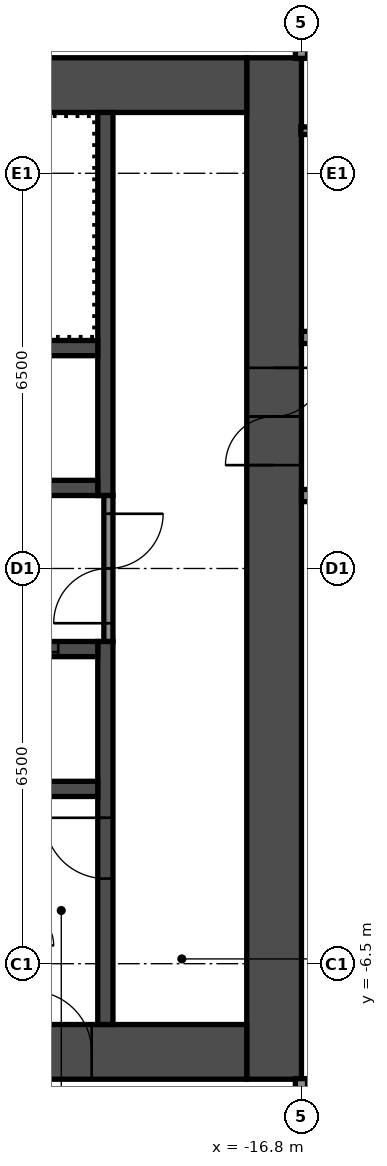
"""IFC4 building model, lengths in metres.
Left out: names, types, materials, properties, quantities, classifications, styles, units other than length and angle.
Written with IfcOpenShell. Run it as: python <this file> out.ifc"""

import sys

from ifc_helpers import new_model, si_unit, direction, frame, frame_2d, origin, place, context, subcontext, project, spatial, rectangle, extrude, element, fill, save


model = new_model("IFC4")
c1 = context("Model", 3, precision=1e-05, world=origin(), true_north=direction((0.0, 1.0)))
c2 = subcontext(c1, "Body", "Model", "MODEL_VIEW")
j1 = project(units=[si_unit("LENGTHUNIT", "METRE"), si_unit("PLANEANGLEUNIT", "RADIAN")], contexts=[c1])
p1 = place(None, origin())
s1 = spatial("IfcSite", under=j1, at=p1, CompositionType="ELEMENT")
p2 = place(p1, origin())
s2 = spatial("IfcBuilding", under=s1, at=p2, CompositionType="ELEMENT")
p3 = place(p2, frame((0.0, 0.0, 209.0)))
s3 = spatial("IfcBuildingStorey", under=s2, at=p3, CompositionType="ELEMENT", Elevation=209.0)
p4 = place(p3, frame((-17.25, -8.4, 0.0), z_axis=(0.0, 0.0, 1.0), x_axis=(0.0, 1.0, 0.0)))
e1 = element("IfcWall", 1, at=p4, inside=s3, PredefinedType="SHEAR", context=c2, shape_type="SweptSolid", body=[
    extrude(rectangle(XDim=16.8, YDim=0.9, at=frame_2d((8.4, 0.0))), origin(), (0.0, 0.0, 1.0), 2.75),
])
p5 = place(p4, frame((10.1, 0.0, 0.0)))
e2 = element("IfcOpeningElement", 2, at=p5, cuts=e1, PredefinedType="OPENING", context=c2, shape_type="SweptSolid", body=[
    extrude(rectangle(XDim=1.6, YDim=2.1, at=frame_2d((0.8, 1.05))), frame((0.0, 0.46, 0.0), z_axis=(0.0, -1.0, 0.0), x_axis=(1.0, 0.0, 0.0)), (0.0, 0.0, 1.0), 0.92),
])
p6 = place(p3, frame((-32.7, 7.95, 0.0), z_axis=(0.0, 0.0, 1.0), x_axis=(1.0, 0.0, 0.0)))
e3 = element("IfcWall", 3, at=p6, inside=s3, PredefinedType="SHEAR", context=c2, shape_type="SweptSolid", body=[
    extrude(rectangle(XDim=15.0, YDim=0.9, at=frame_2d((7.5, 0.0))), origin(), (0.0, 0.0, 1.0), 2.75),
])
p7 = place(p6, frame((3.4, 0.0, 0.0)))
e4 = element("IfcOpeningElement", 4, at=p7, cuts=e3, PredefinedType="OPENING", context=c2, shape_type="SweptSolid", body=[
    extrude(rectangle(XDim=1.2, YDim=2.1, at=frame_2d((0.6, 1.05))), frame((0.0, 0.46, 0.0), z_axis=(0.0, -1.0, 0.0), x_axis=(1.0, 0.0, 0.0)), (0.0, 0.0, 1.0), 0.92),
])
p8 = place(p6, frame((0.75, 0.0, 0.0)))
e5 = element("IfcOpeningElement", 5, at=p8, cuts=e3, PredefinedType="OPENING", context=c2, shape_type="SweptSolid", body=[
    extrude(rectangle(XDim=0.9, YDim=2.1, at=frame_2d((0.45, 1.05))), frame((0.0, 0.46, 0.0), z_axis=(0.0, -1.0, 0.0), x_axis=(1.0, 0.0, 0.0)), (0.0, 0.0, 1.0), 0.92),
])
p9 = place(p3, frame((-32.7, -7.95, 0.0), z_axis=(0.0, 0.0, 1.0), x_axis=(1.0, 0.0, 0.0)))
e6 = element("IfcWall", 6, at=p9, inside=s3, PredefinedType="SHEAR", context=c2, shape_type="SweptSolid", body=[
    extrude(rectangle(XDim=15.0, YDim=0.9, at=frame_2d((7.5, 0.0))), origin(), (0.0, 0.0, 1.0), 2.75),
])
p10 = place(p9, frame((11.45, 0.0, 0.0)))
e7 = element("IfcOpeningElement", 7, at=p10, cuts=e6, PredefinedType="OPENING", context=c2, shape_type="SweptSolid", body=[
    extrude(rectangle(XDim=1.0, YDim=2.1, at=frame_2d((0.5, 1.05))), frame((0.0, 0.46, 0.0), z_axis=(0.0, -1.0, 0.0), x_axis=(1.0, 0.0, 0.0)), (0.0, 0.0, 1.0), 0.92),
])
p11 = place(p3, frame((-20.025, 1.2, 0.0), z_axis=(0.0, 0.0, 1.0), x_axis=(0.0, 1.0, 0.0)))
e8 = element("IfcWall", 8, at=p11, inside=s3, PredefinedType="SHEAR", context=c2, shape_type="SweptSolid", body=[
    extrude(rectangle(XDim=6.3, YDim=0.25, at=frame_2d((3.15, 0.0))), origin(), (0.0, 0.0, 1.0), 2.75),
])
p12 = place(p3, frame((-20.025, -7.5, 0.0), z_axis=(0.0, 0.0, 1.0), x_axis=(0.0, 1.0, 0.0)))
e9 = element("IfcWall", 9, at=p12, inside=s3, PredefinedType="SHEAR", context=c2, shape_type="SweptSolid", body=[
    extrude(rectangle(XDim=6.3, YDim=0.25, at=frame_2d((3.15, 0.0))), origin(), (0.0, 0.0, 1.0), 2.75),
])
p13 = place(p12, frame((2.4, 0.0, 0.0)))
e10 = element("IfcOpeningElement", 10, at=p13, cuts=e9, PredefinedType="OPENING", context=c2, shape_type="SweptSolid", body=[
    extrude(rectangle(XDim=1.0, YDim=2.1, at=frame_2d((0.5, 1.05))), frame((0.0, 0.135, 0.0), z_axis=(0.0, -1.0, 0.0), x_axis=(1.0, 0.0, 0.0)), (0.0, 0.0, 1.0), 0.27),
])
p14 = place(p3, frame((-27.65, 1.325, 0.0), z_axis=(0.0, 0.0, 1.0), x_axis=(1.0, 0.0, 0.0)))
e11 = element("IfcWall", 11, at=p14, inside=s3, PredefinedType="SHEAR", context=c2, shape_type="SweptSolid", body=[
    extrude(rectangle(XDim=7.5, YDim=0.25, at=frame_2d((3.75, 0.0))), origin(), (0.0, 0.0, 1.0), 2.75),
])
p15 = place(p14, frame((4.562, 0.0, 0.0)))
e12 = element("IfcOpeningElement", 12, at=p15, cuts=e11, PredefinedType="OPENING", context=c2, shape_type="SweptSolid", body=[
    extrude(rectangle(XDim=0.9, YDim=2.1, at=frame_2d((0.45, 1.05))), frame((0.0, 0.135, 0.0), z_axis=(0.0, -1.0, 0.0), x_axis=(1.0, 0.0, 0.0)), (0.0, 0.0, 1.0), 0.27),
])
p16 = place(p14, frame((0.863, 0.0, 0.0)))
e13 = element("IfcOpeningElement", 13, at=p16, cuts=e11, PredefinedType="OPENING", context=c2, shape_type="SweptSolid", body=[
    extrude(rectangle(XDim=0.9, YDim=2.1, at=frame_2d((0.45, 1.05))), frame((0.0, 0.135, 0.0), z_axis=(0.0, -1.0, 0.0), x_axis=(1.0, 0.0, 0.0)), (0.0, 0.0, 1.0), 0.27),
])
p17 = place(p3, frame((-27.65, 3.625, 0.0), z_axis=(0.0, 0.0, 1.0), x_axis=(1.0, 0.0, 0.0)))
e14 = element("IfcWall", 14, at=p17, inside=s3, PredefinedType="SHEAR", context=c2, shape_type="SweptSolid", body=[
    extrude(rectangle(XDim=7.5, YDim=0.25, at=frame_2d((3.75, 0.0))), origin(), (0.0, 0.0, 1.0), 2.75),
])
p18 = place(p3, frame((-27.65, -1.325, 0.0), z_axis=(0.0, 0.0, 1.0), x_axis=(1.0, 0.0, 0.0)))
e15 = element("IfcWall", 15, at=p18, inside=s3, PredefinedType="SHEAR", context=c2, shape_type="SweptSolid", body=[
    extrude(rectangle(XDim=7.5, YDim=0.25, at=frame_2d((3.75, 0.0))), origin(), (0.0, 0.0, 1.0), 2.75),
])
p19 = place(p18, frame((5.75, 0.0, 0.0)))
e16 = element("IfcOpeningElement", 16, at=p19, cuts=e15, PredefinedType="OPENING", context=c2, shape_type="SweptSolid", body=[
    extrude(rectangle(XDim=1.1, YDim=2.1, at=frame_2d((0.55, 1.05))), frame((0.0, 0.135, 0.0), z_axis=(0.0, -1.0, 0.0), x_axis=(1.0, 0.0, 0.0)), (0.0, 0.0, 1.0), 0.27),
])
p20 = place(p18, frame((3.35, 0.0, 0.0)))
e17 = element("IfcOpeningElement", 17, at=p20, cuts=e15, PredefinedType="OPENING", context=c2, shape_type="SweptSolid", body=[
    extrude(rectangle(XDim=1.1, YDim=2.1, at=frame_2d((0.55, 1.05))), frame((0.0, 0.135, 0.0), z_axis=(0.0, -1.0, 0.0), x_axis=(1.0, 0.0, 0.0)), (0.0, 0.0, 1.0), 0.27),
])
p21 = place(p18, frame((0.95, 0.0, 0.0)))
e18 = element("IfcOpeningElement", 18, at=p21, cuts=e15, PredefinedType="OPENING", context=c2, shape_type="SweptSolid", body=[
    extrude(rectangle(XDim=1.1, YDim=2.1, at=frame_2d((0.55, 1.05))), frame((0.0, 0.135, 0.0), z_axis=(0.0, -1.0, 0.0), x_axis=(1.0, 0.0, 0.0)), (0.0, 0.0, 1.0), 0.27),
])
p22 = place(p3, frame((-27.65, -3.625, 0.0), z_axis=(0.0, 0.0, 1.0), x_axis=(1.0, 0.0, 0.0)))
e19 = element("IfcWall", 19, at=p22, inside=s3, PredefinedType="SHEAR", context=c2, shape_type="SweptSolid", body=[
    extrude(rectangle(XDim=7.5, YDim=0.25, at=frame_2d((3.75, 0.0))), origin(), (0.0, 0.0, 1.0), 2.75),
])
p23 = place(p3, frame((-19.975, -1.2, 0.0), z_axis=(0.0, 0.0, 1.0), x_axis=(0.0, 1.0, 0.0)))
e20 = element("IfcWall", 20, at=p23, inside=s3, PredefinedType="PARTITIONING", context=c2, shape_type="SweptSolid", body=[
    extrude(rectangle(XDim=2.4, YDim=0.15, at=frame_2d((1.2, 0.0))), origin(), (0.0, 0.0, 1.0), 2.75),
])
p24 = place(p23, frame((0.3, 0.0, 0.0)))
e21 = element("IfcOpeningElement", 21, at=p24, cuts=e20, PredefinedType="OPENING", context=c2, shape_type="SweptSolid", body=[
    extrude(rectangle(XDim=1.8, YDim=2.1, at=frame_2d((0.9, 1.05))), frame((0.0, 0.085, 0.0), z_axis=(0.0, -1.0, 0.0), x_axis=(1.0, 0.0, 0.0)), (0.0, 0.0, 1.0), 0.17),
])
p25 = place(p3, frame((-16.8, 1.2, 0.0), z_axis=(0.0, 0.0, 1.0), x_axis=(1.0, 0.0, 0.0)))
e22 = element("IfcWall", 22, at=p25, inside=s3, PredefinedType="PARTITIONING", context=c2, shape_type="SweptSolid", body=[
    extrude(rectangle(XDim=33.6, YDim=0.2, at=frame_2d((16.8, 0.0))), origin(), (0.0, 0.0, 1.0), 2.75),
])
p26 = place(p25, frame((1.9, 0.0, 0.0)))
e23 = element("IfcOpeningElement", 23, at=p26, cuts=e22, PredefinedType="OPENING", context=c2, shape_type="SweptSolid", body=[
    extrude(rectangle(XDim=1.0, YDim=2.1, at=frame_2d((0.5, 1.05))), frame((0.0, 0.11, 0.0), z_axis=(0.0, -1.0, 0.0), x_axis=(1.0, 0.0, 0.0)), (0.0, 0.0, 1.0), 0.22),
])
p27 = place(p25, frame((11.25, 0.0, 0.0)))
e24 = element("IfcOpeningElement", 24, at=p27, cuts=e22, PredefinedType="OPENING", context=c2, shape_type="SweptSolid", body=[
    extrude(rectangle(XDim=1.0, YDim=2.1, at=frame_2d((0.5, 1.05))), frame((0.0, 0.11, 0.0), z_axis=(0.0, -1.0, 0.0), x_axis=(1.0, 0.0, 0.0)), (0.0, 0.0, 1.0), 0.22),
])
p28 = place(p25, frame((12.95, 0.0, 0.0)))
e25 = element("IfcOpeningElement", 25, at=p28, cuts=e22, PredefinedType="OPENING", context=c2, shape_type="SweptSolid", body=[
    extrude(rectangle(XDim=1.0, YDim=2.1, at=frame_2d((0.5, 1.05))), frame((0.0, 0.11, 0.0), z_axis=(0.0, -1.0, 0.0), x_axis=(1.0, 0.0, 0.0)), (0.0, 0.0, 1.0), 0.22),
])
p29 = place(p25, frame((19.04, 0.0, 0.0)))
e26 = element("IfcOpeningElement", 26, at=p29, cuts=e22, PredefinedType="OPENING", context=c2, shape_type="SweptSolid", body=[
    extrude(rectangle(XDim=0.9, YDim=2.1, at=frame_2d((0.45, 1.05))), frame((0.0, 0.11, 0.0), z_axis=(0.0, -1.0, 0.0), x_axis=(1.0, 0.0, 0.0)), (0.0, 0.0, 1.0), 0.22),
])
p30 = place(p25, frame((23.24, 0.0, 0.0)))
e27 = element("IfcOpeningElement", 27, at=p30, cuts=e22, PredefinedType="OPENING", context=c2, shape_type="SweptSolid", body=[
    extrude(rectangle(XDim=0.9, YDim=2.1, at=frame_2d((0.45, 1.05))), frame((0.0, 0.11, 0.0), z_axis=(0.0, -1.0, 0.0), x_axis=(1.0, 0.0, 0.0)), (0.0, 0.0, 1.0), 0.22),
])
p31 = place(p25, frame((28.05, 0.0, 0.0)))
e28 = element("IfcOpeningElement", 28, at=p31, cuts=e22, PredefinedType="OPENING", context=c2, shape_type="SweptSolid", body=[
    extrude(rectangle(XDim=1.0, YDim=2.1, at=frame_2d((0.5, 1.05))), frame((0.0, 0.11, 0.0), z_axis=(0.0, -1.0, 0.0), x_axis=(1.0, 0.0, 0.0)), (0.0, 0.0, 1.0), 0.22),
])
p32 = place(p25, frame((29.75, 0.0, 0.0)))
e29 = element("IfcOpeningElement", 29, at=p32, cuts=e22, PredefinedType="OPENING", context=c2, shape_type="SweptSolid", body=[
    extrude(rectangle(XDim=1.0, YDim=2.1, at=frame_2d((0.5, 1.05))), frame((0.0, 0.11, 0.0), z_axis=(0.0, -1.0, 0.0), x_axis=(1.0, 0.0, 0.0)), (0.0, 0.0, 1.0), 0.22),
])
p33 = place(p3, frame((-16.8, 3.8, 0.0), z_axis=(0.0, 0.0, 1.0), x_axis=(1.0, 0.0, 0.0)))
e30 = element("IfcWall", 30, at=p33, inside=s3, PredefinedType="PARTITIONING", context=c2, shape_type="SweptSolid", body=[
    extrude(rectangle(XDim=33.6, YDim=0.2, at=frame_2d((16.8, 0.0))), origin(), (0.0, 0.0, 1.0), 2.75),
])
p34 = place(p33, frame((5.4, 0.0, 0.0)))
e31 = element("IfcOpeningElement", 31, at=p34, cuts=e30, PredefinedType="OPENING", context=c2, shape_type="SweptSolid", body=[
    extrude(rectangle(XDim=1.0, YDim=2.1, at=frame_2d((0.5, 1.05))), frame((0.0, 0.11, 0.0), z_axis=(0.0, -1.0, 0.0), x_axis=(1.0, 0.0, 0.0)), (0.0, 0.0, 1.0), 0.22),
])
p35 = place(p33, frame((11.25, 0.0, 0.0)))
e32 = element("IfcOpeningElement", 32, at=p35, cuts=e30, PredefinedType="OPENING", context=c2, shape_type="SweptSolid", body=[
    extrude(rectangle(XDim=1.0, YDim=2.1, at=frame_2d((0.5, 1.05))), frame((0.0, 0.11, 0.0), z_axis=(0.0, -1.0, 0.0), x_axis=(1.0, 0.0, 0.0)), (0.0, 0.0, 1.0), 0.22),
])
p36 = place(p33, frame((12.95, 0.0, 0.0)))
e33 = element("IfcOpeningElement", 33, at=p36, cuts=e30, PredefinedType="OPENING", context=c2, shape_type="SweptSolid", body=[
    extrude(rectangle(XDim=1.0, YDim=2.1, at=frame_2d((0.5, 1.05))), frame((0.0, 0.11, 0.0), z_axis=(0.0, -1.0, 0.0), x_axis=(1.0, 0.0, 0.0)), (0.0, 0.0, 1.0), 0.22),
])
p37 = place(p33, frame((18.87, 0.0, 0.0)))
e34 = element("IfcOpeningElement", 34, at=p37, cuts=e30, PredefinedType="OPENING", context=c2, shape_type="SweptSolid", body=[
    extrude(rectangle(XDim=0.9, YDim=2.1, at=frame_2d((0.45, 1.05))), frame((0.0, 0.11, 0.0), z_axis=(0.0, -1.0, 0.0), x_axis=(1.0, 0.0, 0.0)), (0.0, 0.0, 1.0), 0.22),
])
p38 = place(p33, frame((23.07, 0.0, 0.0)))
e35 = element("IfcOpeningElement", 35, at=p38, cuts=e30, PredefinedType="OPENING", context=c2, shape_type="SweptSolid", body=[
    extrude(rectangle(XDim=0.9, YDim=2.1, at=frame_2d((0.45, 1.05))), frame((0.0, 0.11, 0.0), z_axis=(0.0, -1.0, 0.0), x_axis=(1.0, 0.0, 0.0)), (0.0, 0.0, 1.0), 0.22),
])
p39 = place(p33, frame((28.05, 0.0, 0.0)))
e36 = element("IfcOpeningElement", 36, at=p39, cuts=e30, PredefinedType="OPENING", context=c2, shape_type="SweptSolid", body=[
    extrude(rectangle(XDim=1.0, YDim=2.1, at=frame_2d((0.5, 1.05))), frame((0.0, 0.11, 0.0), z_axis=(0.0, -1.0, 0.0), x_axis=(1.0, 0.0, 0.0)), (0.0, 0.0, 1.0), 0.22),
])
p40 = place(p33, frame((29.75, 0.0, 0.0)))
e37 = element("IfcOpeningElement", 37, at=p40, cuts=e30, PredefinedType="OPENING", context=c2, shape_type="SweptSolid", body=[
    extrude(rectangle(XDim=1.0, YDim=2.1, at=frame_2d((0.5, 1.05))), frame((0.0, 0.11, 0.0), z_axis=(0.0, -1.0, 0.0), x_axis=(1.0, 0.0, 0.0)), (0.0, 0.0, 1.0), 0.22),
])
p41 = place(p3, frame((-16.81, 7.2, 0.0), z_axis=(0.0, 0.0, 1.0), x_axis=(1.0, 0.0, 0.0)))
e38 = element("IfcWall", 38, at=p41, inside=s3, PredefinedType="PARTITIONING", context=c2, shape_type="SweptSolid", body=[
    extrude(rectangle(XDim=3.348, YDim=0.125, at=frame_2d((1.674, 0.0))), origin(), (0.0, 0.0, 1.0), 2.75),
])
p42 = place(p41, frame((1.31, 0.0, 0.0)))
e39 = element("IfcOpeningElement", 39, at=p42, cuts=e38, PredefinedType="OPENING", context=c2, shape_type="SweptSolid", body=[
    extrude(rectangle(XDim=0.8, YDim=2.1, at=frame_2d((0.4, 1.05))), frame((0.0, 0.073, 0.0), z_axis=(0.0, -1.0, 0.0), x_axis=(1.0, 0.0, 0.0)), (0.0, 0.0, 1.0), 0.145),
])
p43 = place(p3, frame((-16.8, -15.55, 0.0), z_axis=(0.0, 0.0, 1.0), x_axis=(0.0, 1.0, 0.0)))
e40 = element("IfcWall", 40, at=p43, inside=s3, PredefinedType="PARTITIONING", context=c2, shape_type="SweptSolid", body=[
    extrude(rectangle(XDim=7.16, YDim=0.2, at=frame_2d((3.58, 0.0))), origin(), (0.0, 0.0, 1.0), 2.75),
])
p44 = place(p3, frame((-16.8, 8.39, 0.0), z_axis=(0.0, 0.0, 1.0), x_axis=(0.0, 1.0, 0.0)))
e41 = element("IfcWall", 41, at=p44, inside=s3, PredefinedType="PARTITIONING", context=c2, shape_type="SweptSolid", body=[
    extrude(rectangle(XDim=12.16, YDim=0.2, at=frame_2d((6.08, 0.0))), origin(), (0.0, 0.0, 1.0), 2.75),
])
p45 = place(p5, origin())
e42 = element("IfcDoor", 42, at=p45, inside=s3, OperationType="DOUBLE_DOOR_SINGLE_SWING", PredefinedType="DOOR", context=c2, shape_type="SweptSolid", body=[
    extrude(rectangle(XDim=1.6, YDim=2.1, at=frame_2d((0.8, 1.05))), frame((0.0, 0.025, 0.0), z_axis=(0.0, -1.0, 0.0), x_axis=(1.0, 0.0, 0.0)), (0.0, 0.0, 1.0), 0.05),
])
fill(e2, e42)
p46 = place(p10, origin())
e43 = element("IfcDoor", 43, at=p46, inside=s3, OperationType="SINGLE_SWING_RIGHT", PredefinedType="DOOR", context=c2, shape_type="SweptSolid", body=[
    extrude(rectangle(XDim=1.0, YDim=2.1, at=frame_2d((0.5, 1.05))), frame((0.0, 0.025, 0.0), z_axis=(0.0, -1.0, 0.0), x_axis=(1.0, 0.0, 0.0)), (0.0, 0.0, 1.0), 0.05),
])
fill(e7, e43)
p47 = place(p13, origin())
e44 = element("IfcDoor", 44, at=p47, inside=s3, OperationType="SINGLE_SWING_LEFT", PredefinedType="DOOR", context=c2, shape_type="SweptSolid", body=[
    extrude(rectangle(XDim=1.0, YDim=2.1, at=frame_2d((0.5, 1.05))), frame((0.0, 0.025, 0.0), z_axis=(0.0, -1.0, 0.0), x_axis=(1.0, 0.0, 0.0)), (0.0, 0.0, 1.0), 0.05),
])
fill(e10, e44)
p48 = place(p24, origin())
e45 = element("IfcDoor", 45, at=p48, inside=s3, OperationType="DOUBLE_DOOR_SINGLE_SWING", PredefinedType="DOOR", context=c2, shape_type="SweptSolid", body=[
    extrude(rectangle(XDim=1.8, YDim=2.1, at=frame_2d((0.9, 1.05))), frame((0.0, 0.025, 0.0), z_axis=(0.0, -1.0, 0.0), x_axis=(1.0, 0.0, 0.0)), (0.0, 0.0, 1.0), 0.05),
])
fill(e21, e45)
p49 = place(p19, origin())
e46 = element("IfcDoor", 46, at=p49, inside=s3, OperationType="DOUBLE_DOOR_SLIDING", PredefinedType="DOOR", context=c2, shape_type="SweptSolid", body=[
    extrude(rectangle(XDim=1.1, YDim=2.1, at=frame_2d((0.55, 1.05))), frame((0.0, 0.025, 0.0), z_axis=(0.0, -1.0, 0.0), x_axis=(1.0, 0.0, 0.0)), (0.0, 0.0, 1.0), 0.05),
])
fill(e16, e46)
save(model, sys.argv[1])
